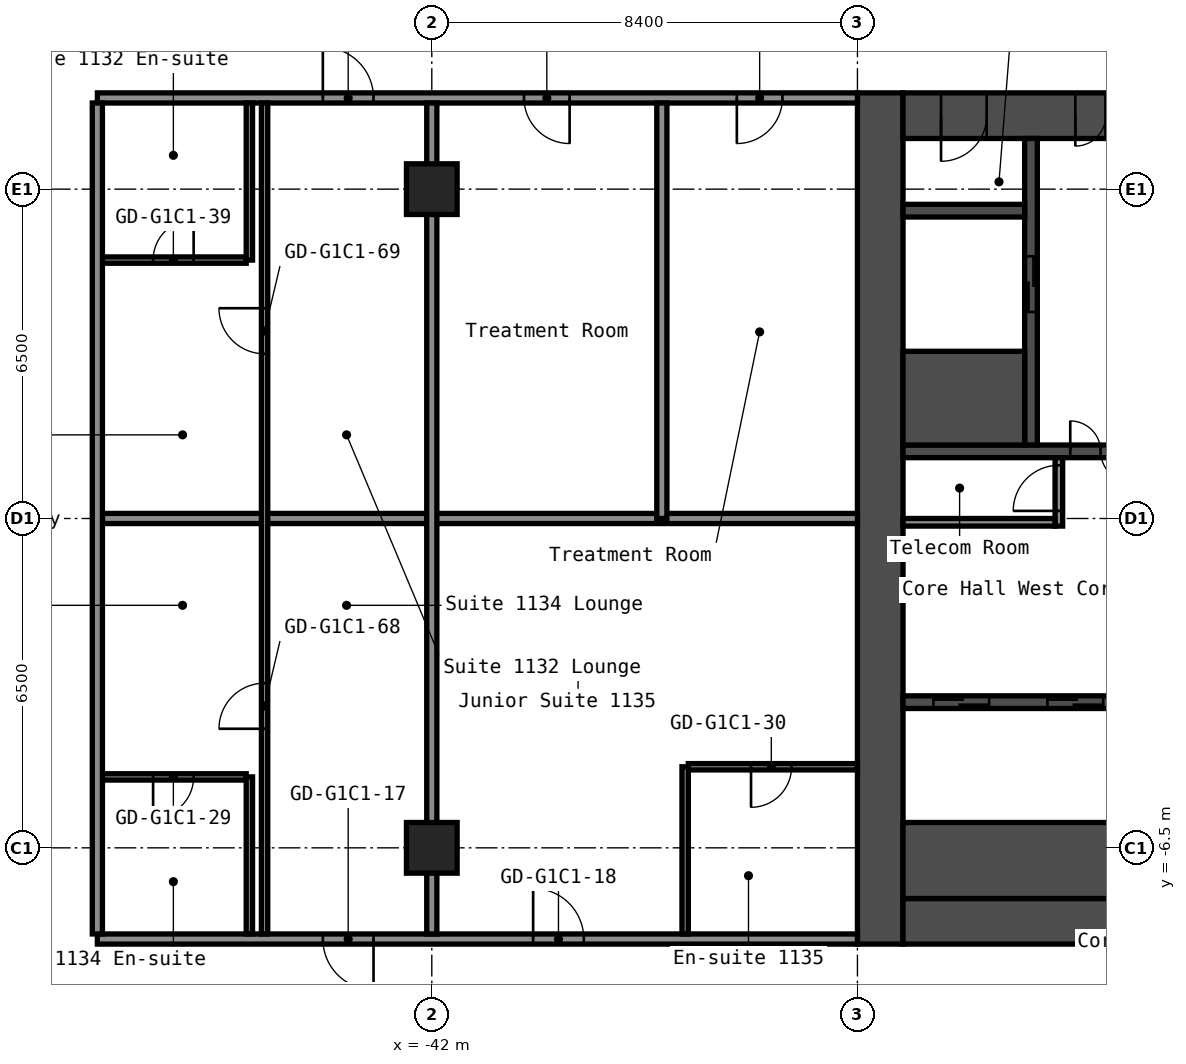
"""IFC4 building model, lengths in metres.
Left out: names, types, materials, properties, quantities, classifications, styles, units other than length and angle.
Written with IfcOpenShell. Run it as: python <this file> out.ifc"""

import sys

from ifc_helpers import new_model, si_unit, direction, frame, frame_2d, origin, origin_2d, place, context, subcontext, project, spatial, rectangle, hollow_rectangle, extrude, element, fill, save


model = new_model("IFC4")
c1 = context("Model", 3, precision=1e-05, world=origin(), true_north=direction((0.0, 1.0)))
c2 = subcontext(c1, "Body", "Model", "MODEL_VIEW")
j1 = project(units=[si_unit("LENGTHUNIT", "METRE"), si_unit("PLANEANGLEUNIT", "RADIAN")], contexts=[c1])
p1 = place(None, origin())
s1 = spatial("IfcSite", under=j1, at=p1, CompositionType="ELEMENT")
p2 = place(p1, origin())
s2 = spatial("IfcBuilding", under=s1, at=p2, CompositionType="ELEMENT")
p3 = place(p2, frame((0.0, 0.0, 42.2)))
s3 = spatial("IfcBuildingStorey", under=s2, at=p3, CompositionType="ELEMENT", Elevation=42.2)
for number, where, z_axis, x_axis in (
    (1, (-42.0, -6.5, 0.0), (0.0, 0.0, 1.0), (1.0, 0.0, 0.0)),
    (2, (-42.0, 6.5, 0.0), (0.0, 0.0, 1.0), (1.0, 0.0, 0.0)),
):
    element("IfcColumn", number, at=place(p3, frame(where, z_axis=z_axis, x_axis=x_axis)), inside=s3, PredefinedType="COLUMN", context=c2, shape_type="SweptSolid", body=[
        extrude(hollow_rectangle(XDim=1.0, YDim=1.0, WallThickness=0.04, at=origin_2d()), origin(), (0.0, 0.0, 1.0), 2.8),
    ])
p4 = place(p3, frame((-33.15, -8.4, 0.0), z_axis=(0.0, 0.0, 1.0), x_axis=(0.0, 1.0, 0.0)))
e3 = element("IfcWall", 3, at=p4, inside=s3, PredefinedType="SHEAR", context=c2, shape_type="SweptSolid", body=[
    extrude(rectangle(XDim=16.8, YDim=0.9, at=frame_2d((8.4, 0.0))), origin(), (0.0, 0.0, 1.0), 2.8),
])
p5 = place(p3, frame((-32.7, 7.95, 0.0), z_axis=(0.0, 0.0, 1.0), x_axis=(1.0, 0.0, 0.0)))
e4 = element("IfcWall", 4, at=p5, inside=s3, PredefinedType="SHEAR", context=c2, shape_type="SweptSolid", body=[
    extrude(rectangle(XDim=15.0, YDim=0.9, at=frame_2d((7.5, 0.0))), origin(), (0.0, 0.0, 1.0), 2.8),
])
p6 = place(p5, frame((3.4, 0.0, 0.0)))
e5 = element("IfcOpeningElement", 5, at=p6, cuts=e4, PredefinedType="OPENING", context=c2, shape_type="SweptSolid", body=[
    extrude(rectangle(XDim=1.2, YDim=2.1, at=frame_2d((0.6, 1.05))), frame((0.0, 0.46, 0.0), z_axis=(0.0, -1.0, 0.0), x_axis=(1.0, 0.0, 0.0)), (0.0, 0.0, 1.0), 0.92),
])
p7 = place(p5, frame((0.75, 0.0, 0.0)))
e6 = element("IfcOpeningElement", 6, at=p7, cuts=e4, PredefinedType="OPENING", context=c2, shape_type="SweptSolid", body=[
    extrude(rectangle(XDim=0.9, YDim=2.1, at=frame_2d((0.45, 1.05))), frame((0.0, 0.46, 0.0), z_axis=(0.0, -1.0, 0.0), x_axis=(1.0, 0.0, 0.0)), (0.0, 0.0, 1.0), 0.92),
])
p8 = place(p3, frame((-32.7, -7.95, 0.0), z_axis=(0.0, 0.0, 1.0), x_axis=(1.0, 0.0, 0.0)))
e7 = element("IfcWall", 7, at=p8, inside=s3, PredefinedType="SHEAR", context=c2, shape_type="SweptSolid", body=[
    extrude(rectangle(XDim=15.0, YDim=0.9, at=frame_2d((7.5, 0.0))), origin(), (0.0, 0.0, 1.0), 2.8),
])
p9 = place(p8, frame((11.45, 0.0, 0.0)))
e8 = element("IfcOpeningElement", 8, at=p9, cuts=e7, PredefinedType="OPENING", context=c2, shape_type="SweptSolid", body=[
    extrude(rectangle(XDim=1.0, YDim=2.1, at=frame_2d((0.5, 1.05))), frame((0.0, 0.46, 0.0), z_axis=(0.0, -1.0, 0.0), x_axis=(1.0, 0.0, 0.0)), (0.0, 0.0, 1.0), 0.92),
])
p10 = place(p3, frame((-32.7, 1.325, 0.0), z_axis=(0.0, 0.0, 1.0), x_axis=(1.0, 0.0, 0.0)))
e9 = element("IfcWall", 9, at=p10, inside=s3, PredefinedType="SHEAR", context=c2, shape_type="SweptSolid", body=[
    extrude(rectangle(XDim=5.05, YDim=0.25, at=frame_2d((2.525, 0.0))), origin(), (0.0, 0.0, 1.0), 2.8),
])
p11 = place(p10, frame((3.3, 0.0, 0.0)))
e10 = element("IfcOpeningElement", 10, at=p11, cuts=e9, PredefinedType="OPENING", context=c2, shape_type="SweptSolid", body=[
    extrude(rectangle(XDim=1.2, YDim=2.1, at=frame_2d((0.6, 1.05))), frame((0.0, 0.135, 0.0), z_axis=(0.0, -1.0, 0.0), x_axis=(1.0, 0.0, 0.0)), (0.0, 0.0, 1.0), 0.27),
])
p12 = place(p3, frame((-30.175, 1.45, 0.0), z_axis=(0.0, 0.0, 1.0), x_axis=(0.0, 1.0, 0.0)))
e11 = element("IfcWall", 11, at=p12, inside=s3, PredefinedType="SHEAR", context=c2, shape_type="SweptSolid", body=[
    extrude(rectangle(XDim=6.05, YDim=0.25, at=frame_2d((3.025, 0.0))), origin(), (0.0, 0.0, 1.0), 2.8),
])
p13 = place(p12, frame((2.625, 0.0, 0.0)))
e12 = element("IfcOpeningElement", 12, at=p13, cuts=e11, PredefinedType="OPENING", context=c2, shape_type="SweptSolid", body=[
    extrude(rectangle(XDim=1.1, YDim=2.1, at=frame_2d((0.55, 1.05))), frame((0.0, 0.135, 0.0), z_axis=(0.0, -1.0, 0.0), x_axis=(1.0, 0.0, 0.0)), (0.0, 0.0, 1.0), 0.27),
])
p14 = place(p3, frame((-32.7, 2.375, 0.0), z_axis=(0.0, 0.0, 1.0), x_axis=(1.0, 0.0, 0.0)))
e13 = element("IfcWall", 13, at=p14, inside=s3, PredefinedType="SHEAR", context=c2, shape_type="SweptSolid", body=[
    extrude(rectangle(XDim=2.4, YDim=1.85, at=frame_2d((1.2, 0.0))), origin(), (0.0, 0.0, 1.0), 2.8),
])
p15 = place(p3, frame((-32.7, 6.075, 0.0), z_axis=(0.0, 0.0, 1.0), x_axis=(1.0, 0.0, 0.0)))
e14 = element("IfcWall", 14, at=p15, inside=s3, PredefinedType="SHEAR", context=c2, shape_type="SweptSolid", body=[
    extrude(rectangle(XDim=2.4, YDim=0.25, at=frame_2d((1.2, 0.0))), origin(), (0.0, 0.0, 1.0), 2.8),
])
p16 = place(p3, frame((-32.7, -3.625, 0.0), z_axis=(0.0, 0.0, 1.0), x_axis=(1.0, 0.0, 0.0)))
e15 = element("IfcWall", 15, at=p16, inside=s3, PredefinedType="SHEAR", context=c2, shape_type="SweptSolid", body=[
    extrude(rectangle(XDim=4.55, YDim=0.25, at=frame_2d((2.275, 0.0))), origin(), (0.0, 0.0, 1.0), 2.8),
])
p17 = place(p16, frame((2.85, 0.0, 0.0)))
e16 = element("IfcOpeningElement", 16, at=p17, cuts=e15, PredefinedType="OPENING", context=c2, shape_type="SweptSolid", body=[
    extrude(rectangle(XDim=1.1, YDim=2.1, at=frame_2d((0.55, 1.05))), frame((0.0, 0.135, 0.0), z_axis=(0.0, -1.0, 0.0), x_axis=(1.0, 0.0, 0.0)), (0.0, 0.0, 1.0), 0.27),
])
p18 = place(p16, frame((0.6, 0.0, 0.0)))
e17 = element("IfcOpeningElement", 17, at=p18, cuts=e15, PredefinedType="OPENING", context=c2, shape_type="SweptSolid", body=[
    extrude(rectangle(XDim=1.1, YDim=2.1, at=frame_2d((0.55, 1.05))), frame((0.0, 0.135, 0.0), z_axis=(0.0, -1.0, 0.0), x_axis=(1.0, 0.0, 0.0)), (0.0, 0.0, 1.0), 0.27),
])
p19 = place(p3, frame((-32.7, -6.75, 0.0), z_axis=(0.0, 0.0, 1.0), x_axis=(1.0, 0.0, 0.0)))
e18 = element("IfcWall", 18, at=p19, inside=s3, PredefinedType="SHEAR", context=c2, shape_type="SweptSolid", body=[
    extrude(rectangle(XDim=4.55, YDim=1.5, at=frame_2d((2.275, 0.0))), origin(), (0.0, 0.0, 1.0), 2.8),
])
p20 = place(p3, frame((-29.625, -0.15, 0.0), z_axis=(0.0, 0.0, 1.0), x_axis=(0.0, 1.0, 0.0)))
e19 = element("IfcWall", 19, at=p20, inside=s3, PredefinedType="PARTITIONING", context=c2, shape_type="SweptSolid", body=[
    extrude(rectangle(XDim=1.35, YDim=0.15, at=frame_2d((0.675, 0.0))), origin(), (0.0, 0.0, 1.0), 2.8),
])
p21 = place(p20, frame((0.3, 0.0, 0.0)))
e20 = element("IfcOpeningElement", 20, at=p21, cuts=e19, PredefinedType="OPENING", context=c2, shape_type="SweptSolid", body=[
    extrude(rectangle(XDim=0.9, YDim=2.1, at=frame_2d((0.45, 1.05))), frame((0.0, 0.085, 0.0), z_axis=(0.0, -1.0, 0.0), x_axis=(1.0, 0.0, 0.0)), (0.0, 0.0, 1.0), 0.17),
])
p22 = place(p3, frame((-32.7, -0.075, 0.0), z_axis=(0.0, 0.0, 1.0), x_axis=(1.0, 0.0, 0.0)))
e21 = element("IfcWall", 21, at=p22, inside=s3, PredefinedType="PARTITIONING", context=c2, shape_type="SweptSolid", body=[
    extrude(rectangle(XDim=3.0, YDim=0.15, at=frame_2d((1.5, 0.0))), origin(), (0.0, 0.0, 1.0), 2.8),
])
p23 = place(p3, frame((-48.6, -8.3, 0.0), z_axis=(0.0, 0.0, 1.0), x_axis=(1.0, 0.0, 0.0)))
e22 = element("IfcWall", 22, at=p23, inside=s3, PredefinedType="PARTITIONING", context=c2, shape_type="SweptSolid", body=[
    extrude(rectangle(XDim=15.0, YDim=0.2, at=frame_2d((7.5, 0.0))), origin(), (0.0, 0.0, 1.0), 2.8),
])
p24 = place(p23, frame((4.45, 0.0, 0.0)))
e23 = element("IfcOpeningElement", 23, at=p24, cuts=e22, PredefinedType="OPENING", context=c2, shape_type="SweptSolid", body=[
    extrude(rectangle(XDim=1.0, YDim=2.1, at=frame_2d((0.5, 1.05))), frame((0.0, 0.11, 0.0), z_axis=(0.0, -1.0, 0.0), x_axis=(1.0, 0.0, 0.0)), (0.0, 0.0, 1.0), 0.22),
])
p25 = place(p23, frame((8.6, 0.0, 0.0)))
e24 = element("IfcOpeningElement", 24, at=p25, cuts=e22, PredefinedType="OPENING", context=c2, shape_type="SweptSolid", body=[
    extrude(rectangle(XDim=1.0, YDim=2.1, at=frame_2d((0.5, 1.05))), frame((0.0, 0.11, 0.0), z_axis=(0.0, -1.0, 0.0), x_axis=(1.0, 0.0, 0.0)), (0.0, 0.0, 1.0), 0.22),
])
p26 = place(p3, frame((-48.5, -5.1, 0.0), z_axis=(0.0, 0.0, 1.0), x_axis=(1.0, 0.0, 0.0)))
e25 = element("IfcWall", 25, at=p26, inside=s3, PredefinedType="PARTITIONING", context=c2, shape_type="SweptSolid", body=[
    extrude(rectangle(XDim=2.837, YDim=0.125, at=frame_2d((1.419, 0.0))), origin(), (0.0, 0.0, 1.0), 2.8),
])
p27 = place(p26, frame((1.0, 0.0, 0.0)))
e26 = element("IfcOpeningElement", 26, at=p27, cuts=e25, PredefinedType="OPENING", context=c2, shape_type="SweptSolid", body=[
    extrude(rectangle(XDim=0.8, YDim=2.1, at=frame_2d((0.4, 1.05))), frame((0.0, 0.073, 0.0), z_axis=(0.0, -1.0, 0.0), x_axis=(1.0, 0.0, 0.0)), (0.0, 0.0, 1.0), 0.145),
])
p28 = place(p3, frame((-36.938, -4.9, 0.0), z_axis=(0.0, 0.0, 1.0), x_axis=(1.0, 0.0, 0.0)))
e27 = element("IfcWall", 27, at=p28, inside=s3, PredefinedType="PARTITIONING", context=c2, shape_type="SweptSolid", body=[
    extrude(rectangle(XDim=3.337, YDim=0.125, at=frame_2d((1.669, 0.0))), origin(), (0.0, 0.0, 1.0), 2.8),
])
p29 = place(p28, frame((1.238, 0.0, 0.0)))
e28 = element("IfcOpeningElement", 28, at=p29, cuts=e27, PredefinedType="OPENING", context=c2, shape_type="SweptSolid", body=[
    extrude(rectangle(XDim=0.8, YDim=2.1, at=frame_2d((0.4, 1.05))), frame((0.0, 0.073, 0.0), z_axis=(0.0, -1.0, 0.0), x_axis=(1.0, 0.0, 0.0)), (0.0, 0.0, 1.0), 0.145),
])
p30 = place(p3, frame((-48.5, 0.0, 0.0), z_axis=(0.0, 0.0, 1.0), x_axis=(1.0, 0.0, 0.0)))
e29 = element("IfcWall", 29, at=p30, inside=s3, PredefinedType="PARTITIONING", context=c2, shape_type="SweptSolid", body=[
    extrude(rectangle(XDim=14.9, YDim=0.2, at=frame_2d((7.45, 0.0))), origin(), (0.0, 0.0, 1.0), 2.8),
])
p31 = place(p3, frame((-48.5, 5.1, 0.0), z_axis=(0.0, 0.0, 1.0), x_axis=(1.0, 0.0, 0.0)))
e30 = element("IfcWall", 30, at=p31, inside=s3, PredefinedType="PARTITIONING", context=c2, shape_type="SweptSolid", body=[
    extrude(rectangle(XDim=2.837, YDim=0.125, at=frame_2d((1.419, 0.0))), origin(), (0.0, 0.0, 1.0), 2.8),
])
p32 = place(p31, frame((1.0, 0.0, 0.0)))
e31 = element("IfcOpeningElement", 31, at=p32, cuts=e30, PredefinedType="OPENING", context=c2, shape_type="SweptSolid", body=[
    extrude(rectangle(XDim=0.8, YDim=2.1, at=frame_2d((0.4, 1.05))), frame((0.0, 0.073, 0.0), z_axis=(0.0, -1.0, 0.0), x_axis=(1.0, 0.0, 0.0)), (0.0, 0.0, 1.0), 0.145),
])
p33 = place(p3, frame((-48.6, 8.3, 0.0), z_axis=(0.0, 0.0, 1.0), x_axis=(1.0, 0.0, 0.0)))
e32 = element("IfcWall", 32, at=p33, inside=s3, PredefinedType="PARTITIONING", context=c2, shape_type="SweptSolid", body=[
    extrude(rectangle(XDim=15.0, YDim=0.2, at=frame_2d((7.5, 0.0))), origin(), (0.0, 0.0, 1.0), 2.8),
])
p34 = place(p33, frame((4.45, 0.0, 0.0)))
e33 = element("IfcOpeningElement", 33, at=p34, cuts=e32, PredefinedType="OPENING", context=c2, shape_type="SweptSolid", body=[
    extrude(rectangle(XDim=1.0, YDim=2.1, at=frame_2d((0.5, 1.05))), frame((0.0, 0.11, 0.0), z_axis=(0.0, -1.0, 0.0), x_axis=(1.0, 0.0, 0.0)), (0.0, 0.0, 1.0), 0.22),
])
p35 = place(p33, frame((8.42, 0.0, 0.0)))
e34 = element("IfcOpeningElement", 34, at=p35, cuts=e32, PredefinedType="OPENING", context=c2, shape_type="SweptSolid", body=[
    extrude(rectangle(XDim=0.9, YDim=2.1, at=frame_2d((0.45, 1.05))), frame((0.0, 0.11, 0.0), z_axis=(0.0, -1.0, 0.0), x_axis=(1.0, 0.0, 0.0)), (0.0, 0.0, 1.0), 0.22),
])
p36 = place(p33, frame((12.62, 0.0, 0.0)))
e35 = element("IfcOpeningElement", 35, at=p36, cuts=e32, PredefinedType="OPENING", context=c2, shape_type="SweptSolid", body=[
    extrude(rectangle(XDim=0.9, YDim=2.1, at=frame_2d((0.45, 1.05))), frame((0.0, 0.11, 0.0), z_axis=(0.0, -1.0, 0.0), x_axis=(1.0, 0.0, 0.0)), (0.0, 0.0, 1.0), 0.22),
])
p37 = place(p3, frame((-48.6, -8.2, 0.0), z_axis=(0.0, 0.0, 1.0), x_axis=(0.0, 1.0, 0.0)))
e36 = element("IfcWall", 36, at=p37, inside=s3, PredefinedType="PARTITIONING", context=c2, shape_type="SweptSolid", body=[
    extrude(rectangle(XDim=16.4, YDim=0.2, at=frame_2d((8.2, 0.0))), origin(), (0.0, 0.0, 1.0), 2.8),
])
for number, where, z_axis, x_axis in (
    (37, (-45.6, -8.2, 0.0), (0.0, 0.0, 1.0), (0.0, 1.0, 0.0)),
    (38, (-45.6, 5.1, 0.0), (0.0, 0.0, 1.0), (0.0, 1.0, 0.0)),
):
    element("IfcWall", number, at=place(p3, frame(where, z_axis=z_axis, x_axis=x_axis)), inside=s3, PredefinedType="PARTITIONING", context=c2, shape_type="SweptSolid", body=[
        extrude(rectangle(XDim=3.1, YDim=0.125, at=frame_2d((1.55, 0.0))), origin(), (0.0, 0.0, 1.0), 2.8),
    ])
p38 = place(p3, frame((-45.3, -8.2, 0.0), z_axis=(0.0, 0.0, 1.0), x_axis=(0.0, 1.0, 0.0)))
e39 = element("IfcWall", 39, at=p38, inside=s3, PredefinedType="PARTITIONING", context=c2, shape_type="SweptSolid", body=[
    extrude(rectangle(XDim=16.4, YDim=0.125, at=frame_2d((8.2, 0.0))), origin(), (0.0, 0.0, 1.0), 2.8),
])
p39 = place(p38, frame((4.05, 0.0, 0.0)))
e40 = element("IfcOpeningElement", 40, at=p39, cuts=e39, PredefinedType="OPENING", context=c2, shape_type="SweptSolid", body=[
    extrude(rectangle(XDim=0.9, YDim=2.1, at=frame_2d((0.45, 1.05))), frame((0.0, 0.073, 0.0), z_axis=(0.0, -1.0, 0.0), x_axis=(1.0, 0.0, 0.0)), (0.0, 0.0, 1.0), 0.145),
])
p40 = place(p38, frame((11.45, 0.0, 0.0)))
e41 = element("IfcOpeningElement", 41, at=p40, cuts=e39, PredefinedType="OPENING", context=c2, shape_type="SweptSolid", body=[
    extrude(rectangle(XDim=0.9, YDim=2.1, at=frame_2d((0.45, 1.05))), frame((0.0, 0.073, 0.0), z_axis=(0.0, -1.0, 0.0), x_axis=(1.0, 0.0, 0.0)), (0.0, 0.0, 1.0), 0.145),
])
p41 = place(p3, frame((-42.0, -8.2, 0.0), z_axis=(0.0, 0.0, 1.0), x_axis=(0.0, 1.0, 0.0)))
e42 = element("IfcWall", 42, at=p41, inside=s3, PredefinedType="PARTITIONING", context=c2, shape_type="SweptSolid", body=[
    extrude(rectangle(XDim=16.4, YDim=0.2, at=frame_2d((8.2, 0.0))), origin(), (0.0, 0.0, 1.0), 2.8),
])
p42 = place(p3, frame((-37.46, 0.0, 0.0), z_axis=(0.0, 0.0, 1.0), x_axis=(0.0, 1.0, 0.0)))
e43 = element("IfcWall", 43, at=p42, inside=s3, PredefinedType="PARTITIONING", context=c2, shape_type="SweptSolid", body=[
    extrude(rectangle(XDim=8.2, YDim=0.2, at=frame_2d((4.1, 0.0))), origin(), (0.0, 0.0, 1.0), 2.8),
])
p43 = place(p3, frame((-37.0, -8.2, 0.0), z_axis=(0.0, 0.0, 1.0), x_axis=(0.0, 1.0, 0.0)))
e44 = element("IfcWall", 44, at=p43, inside=s3, PredefinedType="PARTITIONING", context=c2, shape_type="SweptSolid", body=[
    extrude(rectangle(XDim=3.3, YDim=0.125, at=frame_2d((1.65, 0.0))), origin(), (0.0, 0.0, 1.0), 2.8),
])
p44 = place(p6, origin())
e45 = element("IfcDoor", 45, at=p44, inside=s3, OperationType="DOUBLE_DOOR_SINGLE_SWING", PredefinedType="DOOR", context=c2, shape_type="SweptSolid", body=[
    extrude(rectangle(XDim=1.2, YDim=2.1, at=frame_2d((0.6, 1.05))), frame((0.0, 0.025, 0.0), z_axis=(0.0, -1.0, 0.0), x_axis=(1.0, 0.0, 0.0)), (0.0, 0.0, 1.0), 0.05),
])
fill(e5, e45)
p45 = place(p7, origin())
e46 = element("IfcDoor", 46, at=p45, inside=s3, OperationType="SINGLE_SWING_LEFT", PredefinedType="DOOR", context=c2, shape_type="SweptSolid", body=[
    extrude(rectangle(XDim=0.9, YDim=2.1, at=frame_2d((0.45, 1.05))), frame((0.0, 0.025, 0.0), z_axis=(0.0, -1.0, 0.0), x_axis=(1.0, 0.0, 0.0)), (0.0, 0.0, 1.0), 0.05),
])
fill(e6, e46)
p46 = place(p11, origin())
e47 = element("IfcDoor", 47, at=p46, inside=s3, OperationType="DOUBLE_DOOR_SINGLE_SWING", PredefinedType="DOOR", context=c2, shape_type="SweptSolid", body=[
    extrude(rectangle(XDim=1.2, YDim=2.1, at=frame_2d((0.6, 1.05))), frame((0.0, 0.025, 0.0), z_axis=(0.0, -1.0, 0.0), x_axis=(1.0, 0.0, 0.0)), (0.0, 0.0, 1.0), 0.05),
])
fill(e10, e47)
p47 = place(p21, origin())
e48 = element("IfcDoor", 48, at=p47, inside=s3, OperationType="SINGLE_SWING_RIGHT", PredefinedType="DOOR", context=c2, shape_type="SweptSolid", body=[
    extrude(rectangle(XDim=0.9, YDim=2.1, at=frame_2d((0.45, 1.05))), frame((0.0, 0.025, 0.0), z_axis=(0.0, -1.0, 0.0), x_axis=(1.0, 0.0, 0.0)), (0.0, 0.0, 1.0), 0.05),
])
fill(e20, e48)
p48 = place(p13, origin())
e49 = element("IfcDoor", 49, at=p48, inside=s3, OperationType="DOUBLE_DOOR_SLIDING", PredefinedType="DOOR", context=c2, shape_type="SweptSolid", body=[
    extrude(rectangle(XDim=1.1, YDim=2.1, at=frame_2d((0.55, 1.05))), frame((0.0, 0.025, 0.0), z_axis=(0.0, -1.0, 0.0), x_axis=(1.0, 0.0, 0.0)), (0.0, 0.0, 1.0), 0.05),
])
fill(e12, e49)
p49 = place(p17, origin())
e50 = element("IfcDoor", 50, at=p49, inside=s3, OperationType="DOUBLE_DOOR_SLIDING", PredefinedType="DOOR", context=c2, shape_type="SweptSolid", body=[
    extrude(rectangle(XDim=1.1, YDim=2.1, at=frame_2d((0.55, 1.05))), frame((0.0, 0.025, 0.0), z_axis=(0.0, -1.0, 0.0), x_axis=(1.0, 0.0, 0.0)), (0.0, 0.0, 1.0), 0.05),
])
fill(e16, e50)
p50 = place(p18, origin())
e51 = element("IfcDoor", 51, at=p50, inside=s3, OperationType="DOUBLE_DOOR_SLIDING", PredefinedType="DOOR", context=c2, shape_type="SweptSolid", body=[
    extrude(rectangle(XDim=1.1, YDim=2.1, at=frame_2d((0.55, 1.05))), frame((0.0, 0.025, 0.0), z_axis=(0.0, -1.0, 0.0), x_axis=(1.0, 0.0, 0.0)), (0.0, 0.0, 1.0), 0.05),
])
fill(e17, e51)
p51 = place(p24, origin())
e52 = element("IfcDoor", 52, at=p51, inside=s3, OperationType="SINGLE_SWING_RIGHT", PredefinedType="DOOR", context=c2, shape_type="SweptSolid", body=[
    extrude(rectangle(XDim=1.0, YDim=2.1, at=frame_2d((0.5, 1.05))), frame((0.0, 0.025, 0.0), z_axis=(0.0, -1.0, 0.0), x_axis=(1.0, 0.0, 0.0)), (0.0, 0.0, 1.0), 0.05),
])
fill(e23, e52)
p52 = place(p25, origin())
e53 = element("IfcDoor", 53, at=p52, inside=s3, OperationType="SINGLE_SWING_RIGHT", PredefinedType="DOOR", context=c2, shape_type="SweptSolid", body=[
    extrude(rectangle(XDim=1.0, YDim=2.1, at=frame_2d((0.5, 1.05))), frame((0.0, 0.025, 0.0), z_axis=(0.0, -1.0, 0.0), x_axis=(1.0, 0.0, 0.0)), (0.0, 0.0, 1.0), 0.05),
])
fill(e24, e53)
p53 = place(p27, origin())
e54 = element("IfcDoor", 54, at=p53, inside=s3, OperationType="SINGLE_SWING_LEFT", PredefinedType="DOOR", context=c2, shape_type="SweptSolid", body=[
    extrude(rectangle(XDim=0.8, YDim=2.1, at=frame_2d((0.4, 1.05))), frame((0.0, 0.025, 0.0), z_axis=(0.0, -1.0, 0.0), x_axis=(1.0, 0.0, 0.0)), (0.0, 0.0, 1.0), 0.05),
])
fill(e26, e54)
p54 = place(p29, origin())
e55 = element("IfcDoor", 55, at=p54, inside=s3, OperationType="SINGLE_SWING_LEFT", PredefinedType="DOOR", context=c2, shape_type="SweptSolid", body=[
    extrude(rectangle(XDim=0.8, YDim=2.1, at=frame_2d((0.4, 1.05))), frame((0.0, 0.025, 0.0), z_axis=(0.0, -1.0, 0.0), x_axis=(1.0, 0.0, 0.0)), (0.0, 0.0, 1.0), 0.05),
])
fill(e28, e55)
p55 = place(p32, origin())
e56 = element("IfcDoor", 56, at=p55, inside=s3, OperationType="SINGLE_SWING_LEFT", PredefinedType="DOOR", context=c2, shape_type="SweptSolid", body=[
    extrude(rectangle(XDim=0.8, YDim=2.1, at=frame_2d((0.4, 1.05))), frame((0.0, 0.025, 0.0), z_axis=(0.0, -1.0, 0.0), x_axis=(1.0, 0.0, 0.0)), (0.0, 0.0, 1.0), 0.05),
])
fill(e31, e56)
p56 = place(p34, origin())
e57 = element("IfcDoor", 57, at=p56, inside=s3, OperationType="SINGLE_SWING_RIGHT", PredefinedType="DOOR", context=c2, shape_type="SweptSolid", body=[
    extrude(rectangle(XDim=1.0, YDim=2.1, at=frame_2d((0.5, 1.05))), frame((0.0, 0.025, 0.0), z_axis=(0.0, -1.0, 0.0), x_axis=(1.0, 0.0, 0.0)), (0.0, 0.0, 1.0), 0.05),
])
fill(e33, e57)
p57 = place(p35, origin())
e58 = element("IfcDoor", 58, at=p57, inside=s3, OperationType="SINGLE_SWING_RIGHT", PredefinedType="DOOR", context=c2, shape_type="SweptSolid", body=[
    extrude(rectangle(XDim=0.9, YDim=2.1, at=frame_2d((0.45, 1.05))), frame((0.0, 0.025, 0.0), z_axis=(0.0, -1.0, 0.0), x_axis=(1.0, 0.0, 0.0)), (0.0, 0.0, 1.0), 0.05),
])
fill(e34, e58)
p58 = place(p36, origin())
e59 = element("IfcDoor", 59, at=p58, inside=s3, OperationType="SINGLE_SWING_LEFT", PredefinedType="DOOR", context=c2, shape_type="SweptSolid", body=[
    extrude(rectangle(XDim=0.9, YDim=2.1, at=frame_2d((0.45, 1.05))), frame((0.0, 0.025, 0.0), z_axis=(0.0, -1.0, 0.0), x_axis=(1.0, 0.0, 0.0)), (0.0, 0.0, 1.0), 0.05),
])
fill(e35, e59)
p59 = place(p39, origin())
e60 = element("IfcDoor", 60, at=p59, inside=s3, OperationType="SINGLE_SWING_RIGHT", PredefinedType="DOOR", context=c2, shape_type="SweptSolid", body=[
    extrude(rectangle(XDim=0.9, YDim=2.1, at=frame_2d((0.45, 1.05))), frame((0.0, 0.025, 0.0), z_axis=(0.0, -1.0, 0.0), x_axis=(1.0, 0.0, 0.0)), (0.0, 0.0, 1.0), 0.05),
])
fill(e40, e60)
p60 = place(p40, origin())
e61 = element("IfcDoor", 61, at=p60, inside=s3, OperationType="SINGLE_SWING_LEFT", PredefinedType="DOOR", context=c2, shape_type="SweptSolid", body=[
    extrude(rectangle(XDim=0.9, YDim=2.1, at=frame_2d((0.45, 1.05))), frame((0.0, 0.025, 0.0), z_axis=(0.0, -1.0, 0.0), x_axis=(1.0, 0.0, 0.0)), (0.0, 0.0, 1.0), 0.05),
])
fill(e41, e61)
save(model, sys.argv[1])
